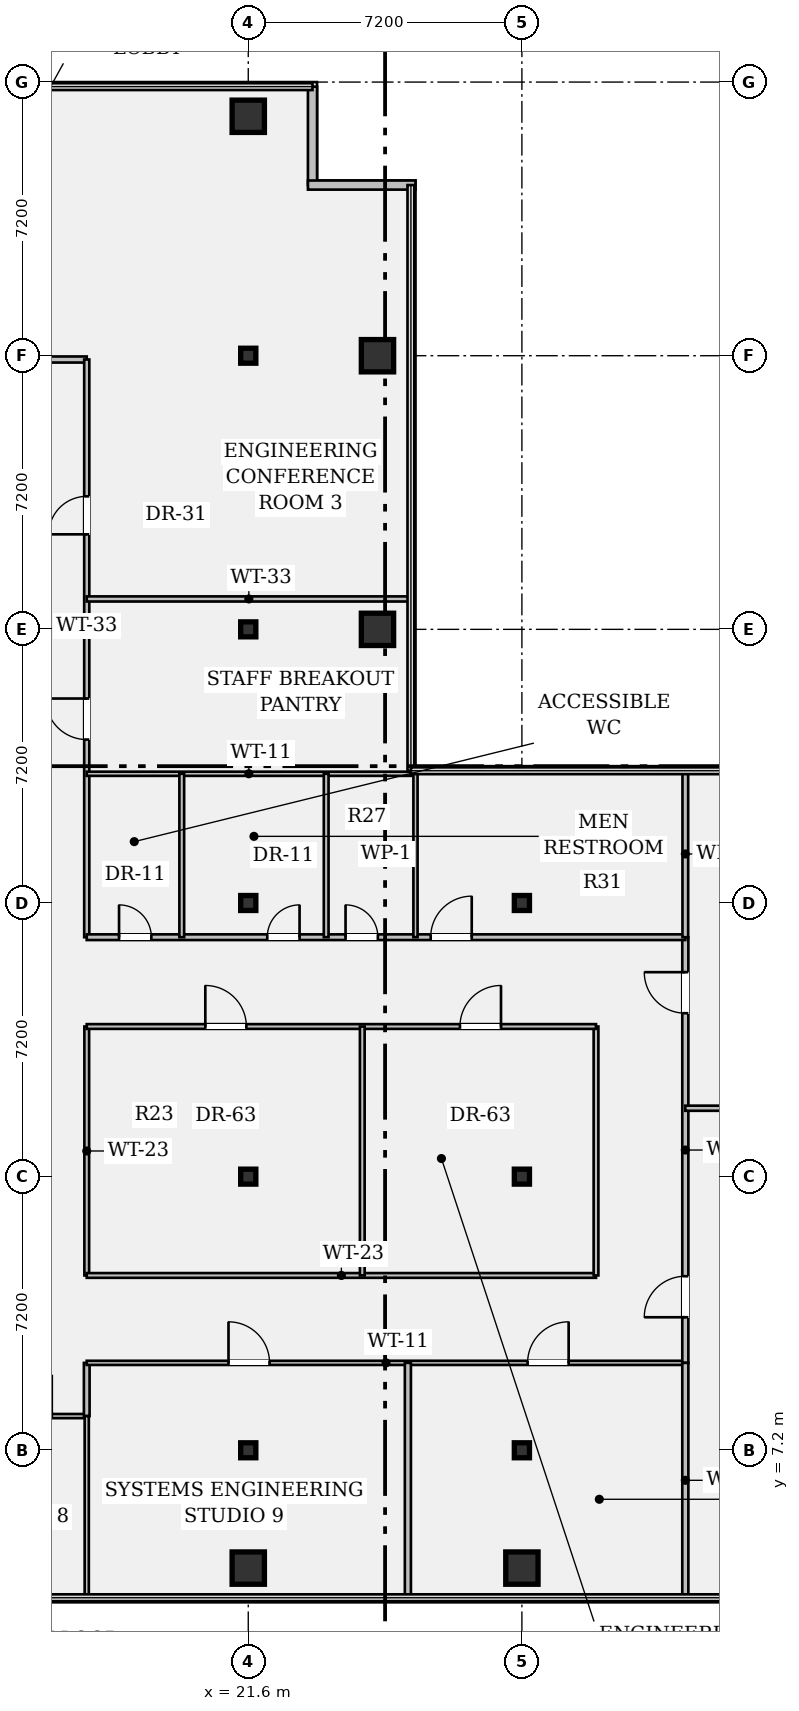
"""IFC4 building model, lengths in metres.
Left out: names, types, materials, properties, quantities, classifications, styles, units other than length and angle.
Written with IfcOpenShell. Run it as: python <this file> out.ifc"""

import sys

from ifc_helpers import new_model, si_unit, direction, frame, frame_2d, origin, origin_2d, place, context, subcontext, project, spatial, rectangle, hollow_rectangle, i_section, extrude, element, fill, save


model = new_model("IFC4")
c1 = context("Model", 3, precision=1e-05, world=origin(), true_north=direction((0.0, 1.0)))
c2 = subcontext(c1, "Body", "Model", "MODEL_VIEW")
j1 = project(units=[si_unit("LENGTHUNIT", "METRE"), si_unit("PLANEANGLEUNIT", "RADIAN")], contexts=[c1])
p1 = place(None, origin())
s1 = spatial("IfcSite", under=j1, at=p1, CompositionType="ELEMENT")
p2 = place(p1, origin())
s2 = spatial("IfcBuilding", under=s1, at=p2, CompositionType="ELEMENT")
p3 = place(p2, frame((0.0, 0.0, 148.4)))
s3 = spatial("IfcBuildingStorey", under=s2, at=p3, CompositionType="ELEMENT", Elevation=148.4)
p4 = place(p3, frame((21.6, 4.1, 0.0), z_axis=(0.0, 0.0, 1.0), x_axis=(1.0, 0.0, 0.0)))
e1 = element("IfcColumn", 1, at=p4, inside=s3, PredefinedType="COLUMN", context=c2, shape_type="SweptSolid", body=[
    extrude(hollow_rectangle(XDim=0.85, YDim=0.85, WallThickness=0.05, at=origin_2d()), origin(), (0.0, 0.0, 1.0), 3.58),
])
for number, where, z_axis, x_axis in (
    (2, (21.6, 7.2, 0.0), (0.0, 0.0, 1.0), (1.0, 0.0, 0.0)),
    (3, (21.6, 14.4, 0.0), (0.0, 0.0, 1.0), (1.0, 0.0, 0.0)),
    (4, (21.6, 21.6, 0.0), (0.0, 0.0, 1.0), (1.0, 0.0, 0.0)),
    (5, (21.6, 28.8, 0.0), (0.0, 0.0, 1.0), (1.0, 0.0, 0.0)),
    (6, (21.6, 36.0, 0.0), (0.0, 0.0, 1.0), (1.0, 0.0, 0.0)),
):
    element("IfcColumn", number, at=place(p3, frame(where, z_axis=z_axis, x_axis=x_axis)), inside=s3, PredefinedType="COLUMN", context=c2, shape_type="SweptSolid", body=[
        extrude(i_section(OverallWidth=0.399, OverallDepth=0.394, WebThickness=0.023, FlangeThickness=0.037, FilletRadius=0.018, at=origin_2d()), origin(), (0.0, 0.0, 1.0), 3.58),
    ])
for number, where, z_axis, x_axis in (
    (7, (21.6, 42.3, 0.0), (0.0, 0.0, 1.0), (1.0, 0.0, 0.0)),
    (8, (25.0, 28.8, 0.0), (0.0, 0.0, 1.0), (1.0, 0.0, 0.0)),
    (9, (25.0, 36.0, 0.0), (0.0, 0.0, 1.0), (1.0, 0.0, 0.0)),
    (10, (28.8, 4.1, 0.0), (0.0, 0.0, 1.0), (1.0, 0.0, 0.0)),
):
    element("IfcColumn", number, at=place(p3, frame(where, z_axis=z_axis, x_axis=x_axis)), inside=s3, PredefinedType="COLUMN", context=c2, shape_type="SweptSolid", body=[
        extrude(hollow_rectangle(XDim=0.85, YDim=0.85, WallThickness=0.05, at=origin_2d()), origin(), (0.0, 0.0, 1.0), 3.58),
    ])
for number, where, z_axis, x_axis in (
    (11, (28.8, 7.2, 0.0), (0.0, 0.0, 1.0), (1.0, 0.0, 0.0)),
    (12, (28.8, 14.4, 0.0), (0.0, 0.0, 1.0), (1.0, 0.0, 0.0)),
    (13, (28.8, 21.6, 0.0), (0.0, 0.0, 1.0), (1.0, 0.0, 0.0)),
):
    element("IfcColumn", number, at=place(p3, frame(where, z_axis=z_axis, x_axis=x_axis)), inside=s3, PredefinedType="COLUMN", context=c2, shape_type="SweptSolid", body=[
        extrude(i_section(OverallWidth=0.399, OverallDepth=0.394, WebThickness=0.023, FlangeThickness=0.037, FilletRadius=0.018, at=origin_2d()), origin(), (0.0, 0.0, 1.0), 3.58),
    ])
p5 = place(p3, frame((23.29, 43.08, 0.0), z_axis=(0.0, 0.0, 1.0), x_axis=(0.0, -1.0, 0.0)))
e14 = element("IfcWall", 14, at=p5, inside=s3, PredefinedType="STANDARD", context=c2, shape_type="SweptSolid", body=[
    extrude(rectangle(XDim=2.59, YDim=0.24, at=frame_2d((1.295, 0.0))), origin(), (0.0, 0.0, 1.0), 3.58),
])
p6 = place(p3, frame((23.17, 40.49, 0.0), z_axis=(0.0, 0.0, 1.0), x_axis=(1.0, 0.0, 0.0)))
e15 = element("IfcWall", 15, at=p6, inside=s3, PredefinedType="STANDARD", context=c2, shape_type="SweptSolid", body=[
    extrude(rectangle(XDim=2.83, YDim=0.24, at=frame_2d((1.415, 0.0))), origin(), (0.0, 0.0, 1.0), 3.58),
])
p7 = place(p3, frame((14.4, 8.1, 0.0), z_axis=(0.0, 0.0, 1.0), x_axis=(1.0, 0.0, 0.0)))
e16 = element("IfcWall", 16, at=p7, inside=s3, PredefinedType="PARTITIONING", context=c2, shape_type="SweptSolid", body=[
    extrude(rectangle(XDim=2.95, YDim=0.11, at=frame_2d((1.475, 0.0))), origin(), (0.0, 0.0, 1.0), 3.148),
])
p8 = place(p7, frame((0.95, 0.0, 0.0)))
e17 = element("IfcOpeningElement", 17, at=p8, cuts=e16, PredefinedType="OPENING", context=c2, shape_type="SweptSolid", body=[
    extrude(rectangle(XDim=1.08, YDim=2.15, at=frame_2d((0.54, 1.075))), frame((0.0, 0.067, 0.0), z_axis=(0.0, -1.0, 0.0), x_axis=(1.0, 0.0, 0.0)), (0.0, 0.0, 1.0), 0.134),
])
p9 = place(p3, frame((14.4, 35.9, 0.0), z_axis=(0.0, 0.0, 1.0), x_axis=(1.0, 0.0, 0.0)))
e18 = element("IfcWall", 18, at=p9, inside=s3, PredefinedType="PARTITIONING", context=c2, shape_type="SweptSolid", body=[
    extrude(rectangle(XDim=2.95, YDim=0.16, at=frame_2d((1.475, 0.0))), origin(), (0.0, 0.0, 1.0), 2.869),
])
p10 = place(p9, frame((0.95, 0.0, 0.0)))
e19 = element("IfcOpeningElement", 19, at=p10, cuts=e18, PredefinedType="OPENING", context=c2, shape_type="SweptSolid", body=[
    extrude(rectangle(XDim=1.0, YDim=2.15, at=frame_2d((0.5, 1.075))), frame((0.0, 0.092, 0.0), z_axis=(0.0, -1.0, 0.0), x_axis=(1.0, 0.0, 0.0)), (0.0, 0.0, 1.0), 0.184),
])
p11 = place(p3, frame((17.35, 8.1, 0.0), z_axis=(0.0, 0.0, 1.0), x_axis=(0.0, 1.0, 0.0)))
e20 = element("IfcWall", 20, at=p11, inside=s3, PredefinedType="PARTITIONING", context=c2, shape_type="SweptSolid", body=[
    extrude(rectangle(XDim=1.4, YDim=0.15, at=frame_2d((0.7, 0.0))), origin(), (0.0, 0.0, 1.0), 3.58),
])
p12 = place(p3, frame((17.35, 20.7, 0.0), z_axis=(0.0, 0.0, 1.0), x_axis=(0.0, 1.0, 0.0)))
e21 = element("IfcWall", 21, at=p12, inside=s3, PredefinedType="PARTITIONING", context=c2, shape_type="SweptSolid", body=[
    extrude(rectangle(XDim=15.2, YDim=0.135, at=frame_2d((7.6, 0.0))), origin(), (0.0, 0.0, 1.0), 2.869),
])
p13 = place(p12, frame((5.2, 0.0, 0.0)))
e22 = element("IfcOpeningElement", 22, at=p13, cuts=e21, PredefinedType="OPENING", context=c2, shape_type="SweptSolid", body=[
    extrude(rectangle(XDim=1.08, YDim=2.15, at=frame_2d((0.54, 1.075))), frame((0.0, 0.08, 0.0), z_axis=(0.0, -1.0, 0.0), x_axis=(1.0, 0.0, 0.0)), (0.0, 0.0, 1.0), 0.159),
])
p14 = place(p12, frame((10.6, 0.0, 0.0)))
e23 = element("IfcOpeningElement", 23, at=p14, cuts=e21, PredefinedType="OPENING", context=c2, shape_type="SweptSolid", body=[
    extrude(rectangle(XDim=1.0, YDim=2.15, at=frame_2d((0.5, 1.075))), frame((0.0, 0.08, 0.0), z_axis=(0.0, -1.0, 0.0), x_axis=(1.0, 0.0, 0.0)), (0.0, 0.0, 1.0), 0.159),
])
p15 = place(p3, frame((17.35, 9.5, 0.0), z_axis=(0.0, 0.0, 1.0), x_axis=(1.0, 0.0, 0.0)))
e24 = element("IfcWall", 24, at=p15, inside=s3, PredefinedType="PARTITIONING", context=c2, shape_type="SweptSolid", body=[
    extrude(rectangle(XDim=15.75, YDim=0.11, at=frame_2d((7.875, 0.0))), origin(), (0.0, 0.0, 1.0), 2.869),
])
p16 = place(p15, frame((3.73, 0.0, 0.0)))
e25 = element("IfcOpeningElement", 25, at=p16, cuts=e24, PredefinedType="OPENING", context=c2, shape_type="SweptSolid", body=[
    extrude(rectangle(XDim=1.08, YDim=2.15, at=frame_2d((0.54, 1.075))), frame((0.0, 0.067, 0.0), z_axis=(0.0, -1.0, 0.0), x_axis=(1.0, 0.0, 0.0)), (0.0, 0.0, 1.0), 0.134),
])
p17 = place(p15, frame((11.6, 0.0, 0.0)))
e26 = element("IfcOpeningElement", 26, at=p17, cuts=e24, PredefinedType="OPENING", context=c2, shape_type="SweptSolid", body=[
    extrude(rectangle(XDim=1.08, YDim=2.15, at=frame_2d((0.54, 1.075))), frame((0.0, 0.067, 0.0), z_axis=(0.0, -1.0, 0.0), x_axis=(1.0, 0.0, 0.0)), (0.0, 0.0, 1.0), 0.134),
])
p18 = place(p3, frame((33.1, 9.5, 0.0), z_axis=(0.0, 0.0, 1.0), x_axis=(0.0, 1.0, 0.0)))
e27 = element("IfcWall", 27, at=p18, inside=s3, PredefinedType="PARTITIONING", context=c2, shape_type="SweptSolid", body=[
    extrude(rectangle(XDim=11.2, YDim=0.16, at=frame_2d((5.6, 0.0))), origin(), (0.0, 0.0, 1.0), 2.869),
])
p19 = place(p18, frame((1.2, 0.0, 0.0)))
e28 = element("IfcOpeningElement", 28, at=p19, cuts=e27, PredefinedType="OPENING", context=c2, shape_type="SweptSolid", body=[
    extrude(rectangle(XDim=1.08, YDim=2.15, at=frame_2d((0.54, 1.075))), frame((0.0, 0.092, 0.0), z_axis=(0.0, -1.0, 0.0), x_axis=(1.0, 0.0, 0.0)), (0.0, 0.0, 1.0), 0.184),
])
p20 = place(p18, frame((9.2, 0.0, 0.0)))
e29 = element("IfcOpeningElement", 29, at=p20, cuts=e27, PredefinedType="OPENING", context=c2, shape_type="SweptSolid", body=[
    extrude(rectangle(XDim=1.08, YDim=2.15, at=frame_2d((0.54, 1.075))), frame((0.0, 0.092, 0.0), z_axis=(0.0, -1.0, 0.0), x_axis=(1.0, 0.0, 0.0)), (0.0, 0.0, 1.0), 0.184),
])
p21 = place(p3, frame((17.35, 20.7, 0.0), z_axis=(0.0, 0.0, 1.0), x_axis=(1.0, 0.0, 0.0)))
e30 = element("IfcWall", 30, at=p21, inside=s3, PredefinedType="PARTITIONING", context=c2, shape_type="SweptSolid", body=[
    extrude(rectangle(XDim=15.75, YDim=0.15, at=frame_2d((7.875, 0.0))), origin(), (0.0, 0.0, 1.0), 2.869),
])
p22 = place(p21, frame((0.85, 0.0, 0.0)))
e31 = element("IfcOpeningElement", 31, at=p22, cuts=e30, PredefinedType="OPENING", context=c2, shape_type="SweptSolid", body=[
    extrude(rectangle(XDim=0.85, YDim=2.15, at=frame_2d((0.425, 1.075))), frame((0.0, 0.087, 0.0), z_axis=(0.0, -1.0, 0.0), x_axis=(1.0, 0.0, 0.0)), (0.0, 0.0, 1.0), 0.174),
])
p23 = place(p21, frame((4.75, 0.0, 0.0)))
e32 = element("IfcOpeningElement", 32, at=p23, cuts=e30, PredefinedType="OPENING", context=c2, shape_type="SweptSolid", body=[
    extrude(rectangle(XDim=0.85, YDim=2.15, at=frame_2d((0.425, 1.075))), frame((0.0, 0.087, 0.0), z_axis=(0.0, -1.0, 0.0), x_axis=(1.0, 0.0, 0.0)), (0.0, 0.0, 1.0), 0.174),
])
p24 = place(p21, frame((6.81, 0.0, 0.0)))
e33 = element("IfcOpeningElement", 33, at=p24, cuts=e30, PredefinedType="OPENING", context=c2, shape_type="SweptSolid", body=[
    extrude(rectangle(XDim=0.85, YDim=2.15, at=frame_2d((0.425, 1.075))), frame((0.0, 0.087, 0.0), z_axis=(0.0, -1.0, 0.0), x_axis=(1.0, 0.0, 0.0)), (0.0, 0.0, 1.0), 0.174),
])
p25 = place(p21, frame((9.05, 0.0, 0.0)))
e34 = element("IfcOpeningElement", 34, at=p25, cuts=e30, PredefinedType="OPENING", context=c2, shape_type="SweptSolid", body=[
    extrude(rectangle(XDim=1.08, YDim=2.15, at=frame_2d((0.54, 1.075))), frame((0.0, 0.087, 0.0), z_axis=(0.0, -1.0, 0.0), x_axis=(1.0, 0.0, 0.0)), (0.0, 0.0, 1.0), 0.174),
])
p26 = place(p3, frame((17.35, 11.8, 0.0), z_axis=(0.0, 0.0, 1.0), x_axis=(0.0, 1.0, 0.0)))
e35 = element("IfcWall", 35, at=p26, inside=s3, PredefinedType="PARTITIONING", context=c2, shape_type="SweptSolid", body=[
    extrude(rectangle(XDim=6.55, YDim=0.125, at=frame_2d((3.275, 0.0))), origin(), (0.0, 0.0, 1.0), 2.869),
])
p27 = place(p3, frame((17.35, 11.8, 0.0), z_axis=(0.0, 0.0, 1.0), x_axis=(1.0, 0.0, 0.0)))
e36 = element("IfcWall", 36, at=p27, inside=s3, PredefinedType="PARTITIONING", context=c2, shape_type="SweptSolid", body=[
    extrude(rectangle(XDim=13.4, YDim=0.125, at=frame_2d((6.7, 0.0))), origin(), (0.0, 0.0, 1.0), 2.869),
])
p28 = place(p3, frame((30.75, 11.8, 0.0), z_axis=(0.0, 0.0, 1.0), x_axis=(0.0, 1.0, 0.0)))
e37 = element("IfcWall", 37, at=p28, inside=s3, PredefinedType="PARTITIONING", context=c2, shape_type="SweptSolid", body=[
    extrude(rectangle(XDim=6.55, YDim=0.125, at=frame_2d((3.275, 0.0))), origin(), (0.0, 0.0, 1.0), 2.869),
])
p29 = place(p3, frame((17.35, 18.35, 0.0), z_axis=(0.0, 0.0, 1.0), x_axis=(1.0, 0.0, 0.0)))
e38 = element("IfcWall", 38, at=p29, inside=s3, PredefinedType="PARTITIONING", context=c2, shape_type="SweptSolid", body=[
    extrude(rectangle(XDim=13.4, YDim=0.125, at=frame_2d((6.7, 0.0))), origin(), (0.0, 0.0, 1.0), 2.869),
])
p30 = place(p29, frame((3.12, 0.0, 0.0)))
e39 = element("IfcOpeningElement", 39, at=p30, cuts=e38, PredefinedType="OPENING", context=c2, shape_type="SweptSolid", body=[
    extrude(rectangle(XDim=1.08, YDim=2.15, at=frame_2d((0.54, 1.075))), frame((0.0, 0.074, 0.0), z_axis=(0.0, -1.0, 0.0), x_axis=(1.0, 0.0, 0.0)), (0.0, 0.0, 1.0), 0.149),
])
p31 = place(p29, frame((9.82, 0.0, 0.0)))
e40 = element("IfcOpeningElement", 40, at=p31, cuts=e38, PredefinedType="OPENING", context=c2, shape_type="SweptSolid", body=[
    extrude(rectangle(XDim=1.08, YDim=2.15, at=frame_2d((0.54, 1.075))), frame((0.0, 0.074, 0.0), z_axis=(0.0, -1.0, 0.0), x_axis=(1.0, 0.0, 0.0)), (0.0, 0.0, 1.0), 0.149),
])
p32 = place(p3, frame((24.6, 11.8, 0.0), z_axis=(0.0, 0.0, 1.0), x_axis=(0.0, 1.0, 0.0)))
e41 = element("IfcWall", 41, at=p32, inside=s3, PredefinedType="PARTITIONING", context=c2, shape_type="SweptSolid", body=[
    extrude(rectangle(XDim=6.55, YDim=0.125, at=frame_2d((3.275, 0.0))), origin(), (0.0, 0.0, 1.0), 2.869),
])
p33 = place(p3, frame((17.35, 25.0, 0.0), z_axis=(0.0, 0.0, 1.0), x_axis=(1.0, 0.0, 0.0)))
e42 = element("IfcWall", 42, at=p33, inside=s3, PredefinedType="PARTITIONING", context=c2, shape_type="SweptSolid", body=[
    extrude(rectangle(XDim=8.53, YDim=0.11, at=frame_2d((4.265, 0.0))), origin(), (0.0, 0.0, 1.0), 2.869),
])
for number, where, z_axis, x_axis in (
    (43, (19.85, 20.7, 0.0), (0.0, 0.0, 1.0), (0.0, 1.0, 0.0)),
    (44, (23.65, 20.7, 0.0), (0.0, 0.0, 1.0), (0.0, 1.0, 0.0)),
):
    element("IfcWall", number, at=place(p3, frame(where, z_axis=z_axis, x_axis=x_axis)), inside=s3, PredefinedType="PARTITIONING", context=c2, shape_type="SweptSolid", body=[
        extrude(rectangle(XDim=4.3, YDim=0.125, at=frame_2d((2.15, 0.0))), origin(), (0.0, 0.0, 1.0), 2.869),
    ])
p34 = place(p3, frame((17.35, 29.6, 0.0), z_axis=(0.0, 0.0, 1.0), x_axis=(1.0, 0.0, 0.0)))
e45 = element("IfcWall", 45, at=p34, inside=s3, PredefinedType="PARTITIONING", context=c2, shape_type="SweptSolid", body=[
    extrude(rectangle(XDim=8.53, YDim=0.135, at=frame_2d((4.265, 0.0))), origin(), (0.0, 0.0, 1.0), 2.869),
])
p35 = place(p3, frame((26.0, 20.7, 0.0), z_axis=(0.0, 0.0, 1.0), x_axis=(0.0, 1.0, 0.0)))
e46 = element("IfcWall", 46, at=p35, inside=s3, PredefinedType="PARTITIONING", context=c2, shape_type="SweptSolid", body=[
    extrude(rectangle(XDim=4.38, YDim=0.11, at=frame_2d((2.19, 0.0))), origin(), (0.0, 0.0, 1.0), 2.869),
])
p36 = place(p3, frame((33.1, 3.32, 0.0), z_axis=(0.0, 0.0, 1.0), x_axis=(0.0, 1.0, 0.0)))
e47 = element("IfcWall", 47, at=p36, inside=s3, PredefinedType="PARTITIONING", context=c2, shape_type="SweptSolid", body=[
    extrude(rectangle(XDim=6.18, YDim=0.16, at=frame_2d((3.09, 0.0))), origin(), (0.0, 0.0, 1.0), 2.869),
])
p37 = place(p3, frame((33.1, 20.7, 0.0), z_axis=(0.0, 0.0, 1.0), x_axis=(0.0, 1.0, 0.0)))
e48 = element("IfcWall", 48, at=p37, inside=s3, PredefinedType="PARTITIONING", context=c2, shape_type="SweptSolid", body=[
    extrude(rectangle(XDim=4.38, YDim=0.15, at=frame_2d((2.19, 0.0))), origin(), (0.0, 0.0, 1.0), 2.869),
])
p38 = place(p3, frame((33.1, 16.2, 0.0), z_axis=(0.0, 0.0, 1.0), x_axis=(1.0, 0.0, 0.0)))
e49 = element("IfcWall", 49, at=p38, inside=s3, PredefinedType="PARTITIONING", context=c2, shape_type="SweptSolid", body=[
    extrude(rectangle(XDim=13.98, YDim=0.135, at=frame_2d((6.99, 0.0))), origin(), (0.0, 0.0, 1.0), 2.869),
])
p39 = place(p3, frame((17.35, 3.32, 0.0), z_axis=(0.0, 0.0, 1.0), x_axis=(0.0, 1.0, 0.0)))
e50 = element("IfcWall", 50, at=p39, inside=s3, PredefinedType="PARTITIONING", context=c2, shape_type="SweptSolid", body=[
    extrude(rectangle(XDim=4.78, YDim=0.11, at=frame_2d((2.39, 0.0))), origin(), (0.0, 0.0, 1.0), 2.869),
])
p40 = place(p3, frame((25.8, 3.32, 0.0), z_axis=(0.0, 0.0, 1.0), x_axis=(0.0, 1.0, 0.0)))
e51 = element("IfcWall", 51, at=p40, inside=s3, PredefinedType="PARTITIONING", context=c2, shape_type="SweptSolid", body=[
    extrude(rectangle(XDim=6.18, YDim=0.16, at=frame_2d((3.09, 0.0))), origin(), (0.0, 0.0, 1.0), 2.869),
])
p41 = place(p30, origin())
e52 = element("IfcDoor", 52, at=p41, inside=s3, OperationType="SINGLE_SWING_LEFT", PredefinedType="DOOR", context=c2, shape_type="SweptSolid", body=[
    extrude(rectangle(XDim=1.08, YDim=2.15, at=frame_2d((0.54, 1.075))), frame((0.0, 0.025, 0.0), z_axis=(0.0, -1.0, 0.0), x_axis=(1.0, 0.0, 0.0)), (0.0, 0.0, 1.0), 0.05),
])
fill(e39, e52)
p42 = place(p31, origin())
e53 = element("IfcDoor", 53, at=p42, inside=s3, OperationType="SINGLE_SWING_RIGHT", PredefinedType="DOOR", context=c2, shape_type="SweptSolid", body=[
    extrude(rectangle(XDim=1.08, YDim=2.15, at=frame_2d((0.54, 1.075))), frame((0.0, 0.025, 0.0), z_axis=(0.0, -1.0, 0.0), x_axis=(1.0, 0.0, 0.0)), (0.0, 0.0, 1.0), 0.05),
])
fill(e40, e53)
p43 = place(p22, origin())
e54 = element("IfcDoor", 54, at=p43, inside=s3, OperationType="SINGLE_SWING_LEFT", PredefinedType="DOOR", context=c2, shape_type="SweptSolid", body=[
    extrude(rectangle(XDim=0.85, YDim=2.15, at=frame_2d((0.425, 1.075))), frame((0.0, 0.025, 0.0), z_axis=(0.0, -1.0, 0.0), x_axis=(1.0, 0.0, 0.0)), (0.0, 0.0, 1.0), 0.05),
])
fill(e31, e54)
p44 = place(p23, origin())
e55 = element("IfcDoor", 55, at=p44, inside=s3, OperationType="SINGLE_SWING_RIGHT", PredefinedType="DOOR", context=c2, shape_type="SweptSolid", body=[
    extrude(rectangle(XDim=0.85, YDim=2.15, at=frame_2d((0.425, 1.075))), frame((0.0, 0.025, 0.0), z_axis=(0.0, -1.0, 0.0), x_axis=(1.0, 0.0, 0.0)), (0.0, 0.0, 1.0), 0.05),
])
fill(e32, e55)
p45 = place(p24, origin())
e56 = element("IfcDoor", 56, at=p45, inside=s3, OperationType="SINGLE_SWING_LEFT", PredefinedType="DOOR", context=c2, shape_type="SweptSolid", body=[
    extrude(rectangle(XDim=0.85, YDim=2.15, at=frame_2d((0.425, 1.075))), frame((0.0, 0.025, 0.0), z_axis=(0.0, -1.0, 0.0), x_axis=(1.0, 0.0, 0.0)), (0.0, 0.0, 1.0), 0.05),
])
fill(e33, e56)
p46 = place(p13, origin())
e57 = element("IfcDoor", 57, at=p46, inside=s3, OperationType="SINGLE_SWING_RIGHT", PredefinedType="DOOR", context=c2, shape_type="SweptSolid", body=[
    extrude(rectangle(XDim=1.08, YDim=2.15, at=frame_2d((0.54, 1.075))), frame((0.0, 0.025, 0.0), z_axis=(0.0, -1.0, 0.0), x_axis=(1.0, 0.0, 0.0)), (0.0, 0.0, 1.0), 0.05),
])
fill(e22, e57)
p47 = place(p14, origin())
e58 = element("IfcDoor", 58, at=p47, inside=s3, OperationType="SINGLE_SWING_LEFT", PredefinedType="DOOR", context=c2, shape_type="SweptSolid", body=[
    extrude(rectangle(XDim=1.0, YDim=2.15, at=frame_2d((0.5, 1.075))), frame((0.0, 0.025, 0.0), z_axis=(0.0, -1.0, 0.0), x_axis=(1.0, 0.0, 0.0)), (0.0, 0.0, 1.0), 0.05),
])
fill(e23, e58)
p48 = place(p25, origin())
e59 = element("IfcDoor", 59, at=p48, inside=s3, OperationType="SINGLE_SWING_RIGHT", PredefinedType="DOOR", context=c2, shape_type="SweptSolid", body=[
    extrude(rectangle(XDim=1.08, YDim=2.15, at=frame_2d((0.54, 1.075))), frame((0.0, 0.025, 0.0), z_axis=(0.0, -1.0, 0.0), x_axis=(1.0, 0.0, 0.0)), (0.0, 0.0, 1.0), 0.05),
])
fill(e34, e59)
p49 = place(p19, origin())
e60 = element("IfcDoor", 60, at=p49, inside=s3, OperationType="SINGLE_SWING_LEFT", PredefinedType="DOOR", context=c2, shape_type="SweptSolid", body=[
    extrude(rectangle(XDim=1.08, YDim=2.15, at=frame_2d((0.54, 1.075))), frame((0.0, 0.025, 0.0), z_axis=(0.0, -1.0, 0.0), x_axis=(1.0, 0.0, 0.0)), (0.0, 0.0, 1.0), 0.05),
])
fill(e28, e60)
p50 = place(p20, origin())
e61 = element("IfcDoor", 61, at=p50, inside=s3, OperationType="SINGLE_SWING_RIGHT", PredefinedType="DOOR", context=c2, shape_type="SweptSolid", body=[
    extrude(rectangle(XDim=1.08, YDim=2.15, at=frame_2d((0.54, 1.075))), frame((0.0, 0.025, 0.0), z_axis=(0.0, -1.0, 0.0), x_axis=(1.0, 0.0, 0.0)), (0.0, 0.0, 1.0), 0.05),
])
fill(e29, e61)
p51 = place(p16, origin())
e62 = element("IfcDoor", 62, at=p51, inside=s3, OperationType="SINGLE_SWING_LEFT", PredefinedType="DOOR", context=c2, shape_type="SweptSolid", body=[
    extrude(rectangle(XDim=1.08, YDim=2.15, at=frame_2d((0.54, 1.075))), frame((0.0, 0.025, 0.0), z_axis=(0.0, -1.0, 0.0), x_axis=(1.0, 0.0, 0.0)), (0.0, 0.0, 1.0), 0.05),
])
fill(e25, e62)
p52 = place(p17, origin())
e63 = element("IfcDoor", 63, at=p52, inside=s3, OperationType="SINGLE_SWING_RIGHT", PredefinedType="DOOR", context=c2, shape_type="SweptSolid", body=[
    extrude(rectangle(XDim=1.08, YDim=2.15, at=frame_2d((0.54, 1.075))), frame((0.0, 0.025, 0.0), z_axis=(0.0, -1.0, 0.0), x_axis=(1.0, 0.0, 0.0)), (0.0, 0.0, 1.0), 0.05),
])
fill(e26, e63)
save(model, sys.argv[1])
